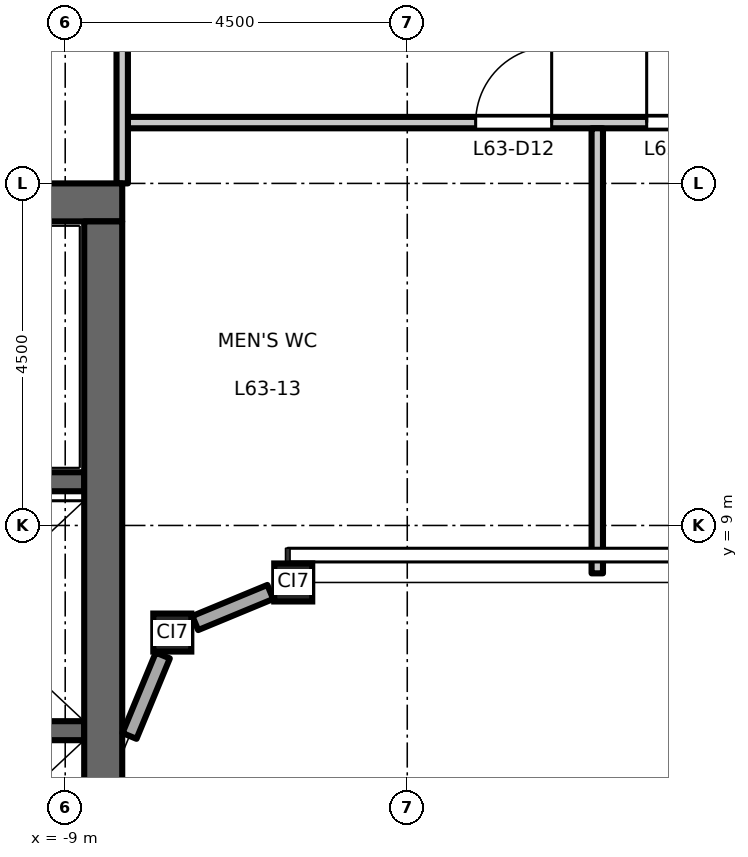
"""IFC4 building model, lengths in metres.
Left out: names, types, materials, properties, quantities, classifications, styles, units other than length and angle.
Written with IfcOpenShell. Run it as: python <this file> out.ifc"""

import sys

from ifc_helpers import new_model, si_unit, direction, frame, frame_2d, origin, origin_2d, place, context, subcontext, project, spatial, rectangle, hollow_rectangle, extrude, element, fill, save


model = new_model("IFC4")
c1 = context("Model", 3, precision=1e-05, world=origin(), true_north=direction((0.0, 1.0)))
c2 = subcontext(c1, "Body", "Model", "MODEL_VIEW")
j1 = project(units=[si_unit("LENGTHUNIT", "METRE"), si_unit("PLANEANGLEUNIT", "RADIAN")], contexts=[c1])
p1 = place(None, origin())
s1 = spatial("IfcSite", under=j1, at=p1, CompositionType="ELEMENT")
p2 = place(p1, origin())
s2 = spatial("IfcBuilding", under=s1, at=p2, CompositionType="ELEMENT")
p3 = place(p2, frame((0.0, 0.0, 294.2)))
s3 = spatial("IfcBuildingStorey", under=s2, at=p3, CompositionType="ELEMENT", Elevation=294.2)
for number, where, z_axis, x_axis in (
    (1, (-7.591, 7.591, 0.0), (0.0, 0.0, 1.0), (1.0, 0.0, 0.0)),
    (2, (-6.0, 8.25, 0.0), (0.0, 0.0, 1.0), (1.0, 0.0, 0.0)),
):
    element("IfcColumn", number, at=place(p3, frame(where, z_axis=z_axis, x_axis=x_axis)), inside=s3, PredefinedType="COLUMN", context=c2, shape_type="SweptSolid", body=[
        extrude(hollow_rectangle(XDim=0.5, YDim=0.5, WallThickness=0.025, at=origin_2d()), origin(), (0.0, 0.0, 1.0), 4.5),
    ])
p4 = place(p3, frame((-8.75, 6.3, 0.0), z_axis=(0.0, 0.0, 1.0), x_axis=(-1.0, 0.0, 0.0)))
e3 = element("IfcWall", 3, at=p4, inside=s3, PredefinedType="SHEAR", context=c2, shape_type="SweptSolid", body=[
    extrude(rectangle(XDim=3.1, YDim=0.25, at=frame_2d((1.55, 0.0))), origin(), (0.0, 0.0, 1.0), 4.35),
])
p5 = place(p3, frame((-8.75, 9.575, 0.0), z_axis=(0.0, 0.0, 1.0), x_axis=(-1.0, 0.0, 0.0)))
e4 = element("IfcWall", 4, at=p5, inside=s3, PredefinedType="SHEAR", context=c2, shape_type="SweptSolid", body=[
    extrude(rectangle(XDim=8.0, YDim=0.25, at=frame_2d((4.0, 0.0))), origin(), (0.0, 0.0, 1.0), 4.35),
])
p6 = place(p5, frame((6.65, 0.0, 0.0)))
e5 = element("IfcOpeningElement", 5, at=p6, cuts=e4, PredefinedType="OPENING", context=c2, shape_type="SweptSolid", body=[
    extrude(rectangle(XDim=1.1, YDim=2.1, at=frame_2d((0.55, 1.05))), frame((0.0, 0.135, 0.0), z_axis=(0.0, -1.0, 0.0), x_axis=(1.0, 0.0, 0.0)), (0.0, 0.0, 1.0), 0.27),
])
p7 = place(p3, frame((-8.25, 13.25, 0.0), z_axis=(0.0, 0.0, 1.0), x_axis=(-1.0, 0.0, 0.0)))
e6 = element("IfcWall", 6, at=p7, inside=s3, PredefinedType="SHEAR", context=c2, shape_type="SweptSolid", body=[
    extrude(rectangle(XDim=9.0, YDim=0.5, at=frame_2d((4.5, 0.0))), origin(), (0.0, 0.0, 1.0), 4.35),
])
p8 = place(p3, frame((-8.5, -13.0, 0.0), z_axis=(0.0, 0.0, 1.0), x_axis=(0.0, 1.0, 0.0)))
e7 = element("IfcWall", 7, at=p8, inside=s3, PredefinedType="SHEAR", context=c2, shape_type="SweptSolid", body=[
    extrude(rectangle(XDim=26.0, YDim=0.5, at=frame_2d((13.0, 0.0))), origin(), (0.0, 0.0, 1.0), 4.35),
])
p9 = place(p3, frame((-6.302, 8.125, 0.0), z_axis=(0.0, 0.0, 1.0), x_axis=(-0.923919409248, -0.382587147216, 0.0)))
e8 = element("IfcWall", 8, at=p9, inside=s3, PredefinedType="STANDARD", context=c2, shape_type="SweptSolid", body=[
    extrude(rectangle(XDim=1.069, YDim=0.2, at=frame_2d((0.534, 0.0))), origin(), (0.0, 0.0, 1.0), 4.01),
])
p10 = place(p3, frame((-7.716, 7.289, 0.0), z_axis=(0.0, 0.0, 1.0), x_axis=(-0.382571404949, -0.923925927829, 0.0)))
e9 = element("IfcWall", 9, at=p10, inside=s3, PredefinedType="STANDARD", context=c2, shape_type="SweptSolid", body=[
    extrude(rectangle(XDim=1.146, YDim=0.2, at=frame_2d((0.573, 0.0))), origin(), (0.0, 0.0, 1.0), 4.01),
])
p11 = place(p3, frame((-8.175, 14.3, 0.0), z_axis=(0.0, 0.0, 1.0), x_axis=(1.0, 0.0, 0.0)))
e10 = element("IfcWall", 10, at=p11, inside=s3, PredefinedType="PARTITIONING", context=c2, shape_type="SweptSolid", body=[
    extrude(rectangle(XDim=15.095, YDim=0.15, at=frame_2d((7.547, 0.0))), origin(), (0.0, 0.0, 1.0), 4.35),
])
p12 = place(p11, frame((4.575, 0.0, 0.0)))
e11 = element("IfcOpeningElement", 11, at=p12, cuts=e10, PredefinedType="OPENING", context=c2, shape_type="SweptSolid", body=[
    extrude(rectangle(XDim=1.0, YDim=2.1, at=frame_2d((0.5, 1.05))), frame((0.0, 0.085, 0.0), z_axis=(0.0, -1.0, 0.0), x_axis=(1.0, 0.0, 0.0)), (0.0, 0.0, 1.0), 0.17),
])
p13 = place(p11, frame((6.825, 0.0, 0.0)))
e12 = element("IfcOpeningElement", 12, at=p13, cuts=e10, PredefinedType="OPENING", context=c2, shape_type="SweptSolid", body=[
    extrude(rectangle(XDim=1.0, YDim=2.1, at=frame_2d((0.5, 1.05))), frame((0.0, 0.085, 0.0), z_axis=(0.0, -1.0, 0.0), x_axis=(1.0, 0.0, 0.0)), (0.0, 0.0, 1.0), 0.17),
])
p14 = place(p11, frame((13.575, 0.0, 0.0)))
e13 = element("IfcOpeningElement", 13, at=p14, cuts=e10, PredefinedType="OPENING", context=c2, shape_type="SweptSolid", body=[
    extrude(rectangle(XDim=1.0, YDim=2.1, at=frame_2d((0.5, 1.05))), frame((0.0, 0.085, 0.0), z_axis=(0.0, -1.0, 0.0), x_axis=(1.0, 0.0, 0.0)), (0.0, 0.0, 1.0), 0.17),
])
p15 = place(p3, frame((-8.25, 13.5, 0.0), z_axis=(0.0, 0.0, 1.0), x_axis=(0.0, 1.0, 0.0)))
e14 = element("IfcWall", 14, at=p15, inside=s3, PredefinedType="PARTITIONING", context=c2, shape_type="SweptSolid", body=[
    extrude(rectangle(XDim=2.925, YDim=0.15, at=frame_2d((1.462, 0.0))), origin(), (0.0, 0.0, 1.0), 4.35),
])
p16 = place(p3, frame((-2.0, 8.37, 0.0), z_axis=(0.0, 0.0, 1.0), x_axis=(0.0, 1.0, 0.0)))
e15 = element("IfcWall", 15, at=p16, inside=s3, PredefinedType="PARTITIONING", context=c2, shape_type="SweptSolid", body=[
    extrude(rectangle(XDim=5.855, YDim=0.15, at=frame_2d((2.927, 0.0))), origin(), (0.0, 0.0, 1.0), 4.35),
])
p17 = place(p12, origin())
e16 = element("IfcDoor", 16, at=p17, inside=s3, OperationType="SINGLE_SWING_RIGHT", PredefinedType="DOOR", context=c2, shape_type="SweptSolid", body=[
    extrude(rectangle(XDim=1.0, YDim=2.1, at=frame_2d((0.5, 1.05))), frame((0.0, 0.025, 0.0), z_axis=(0.0, -1.0, 0.0), x_axis=(1.0, 0.0, 0.0)), (0.0, 0.0, 1.0), 0.05),
])
fill(e11, e16)
p18 = place(p13, origin())
e17 = element("IfcDoor", 17, at=p18, inside=s3, OperationType="SINGLE_SWING_LEFT", PredefinedType="DOOR", context=c2, shape_type="SweptSolid", body=[
    extrude(rectangle(XDim=1.0, YDim=2.1, at=frame_2d((0.5, 1.05))), frame((0.0, 0.025, 0.0), z_axis=(0.0, -1.0, 0.0), x_axis=(1.0, 0.0, 0.0)), (0.0, 0.0, 1.0), 0.05),
])
fill(e12, e17)
save(model, sys.argv[1])
